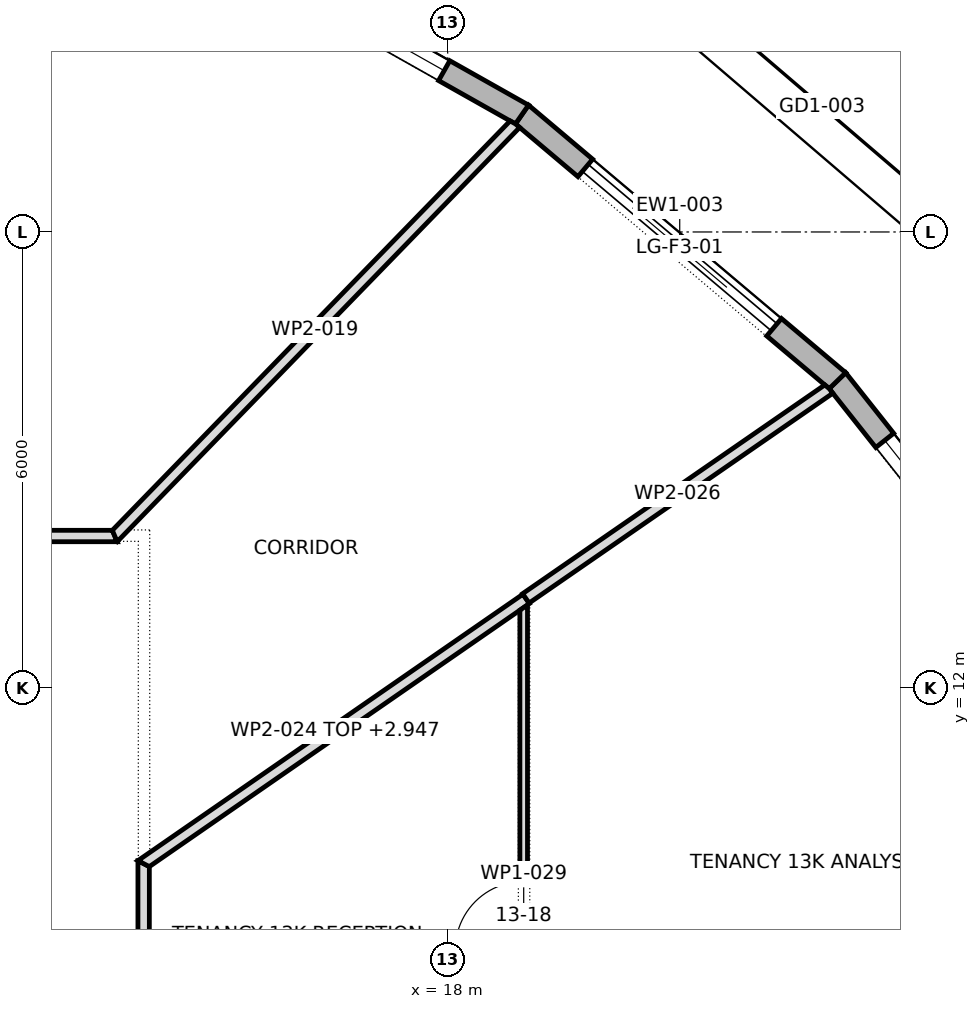
"""IFC4 building model, lengths in metres.
Left out: names, types, materials, properties, quantities, classifications, styles, units other than length and angle.
Written with IfcOpenShell. Run it as: python <this file> out.ifc"""

import sys

from ifc_helpers import new_model, si_unit, direction, frame, frame_2d, origin, place, context, subcontext, project, spatial, polyline, rectangle, outline, extrude, element, fill, save


model = new_model("IFC4")
c1 = context("Model", 3, precision=1e-05, world=origin(), true_north=direction((0.0, 1.0)))
c2 = subcontext(c1, "Body", "Model", "MODEL_VIEW")
j1 = project(units=[si_unit("LENGTHUNIT", "METRE"), si_unit("PLANEANGLEUNIT", "RADIAN")], contexts=[c1])
p1 = place(None, origin())
s1 = spatial("IfcSite", under=j1, at=p1, CompositionType="ELEMENT")
p2 = place(p1, origin())
s2 = spatial("IfcBuilding", under=s1, at=p2, CompositionType="ELEMENT")
p3 = place(p2, frame((0.0, 0.0, 190.9)))
s3 = spatial("IfcBuildingStorey", under=s2, at=p3, CompositionType="ELEMENT", Elevation=190.9)
p4 = place(p3, frame((26.39, 11.924, 0.0), z_axis=(0.0, 0.0, 1.0), x_axis=(-0.620829074232, 0.783945955145, 0.0)))
e1 = element("IfcWall", 1, at=p4, inside=s3, PredefinedType="STANDARD", context=c2, shape_type="SweptSolid", body=[
    extrude(outline(polyline([(-0.016, -0.15), (5.27, -0.15), (5.24, 0.15), (0.016, 0.15), (-0.016, -0.15)])), origin(), (0.0, 0.0, 1.0), 3.7),
])
p5 = place(p4, frame((1.003, 0.0, 0.6)))
e2 = element("IfcOpeningElement", 2, at=p5, cuts=e1, PredefinedType="OPENING", context=c2, shape_type="SweptSolid", body=[
    extrude(rectangle(XDim=3.25, YDim=2.65, at=frame_2d((1.625, 1.325))), frame((0.0, 0.162, 0.0), z_axis=(0.0, -1.0, 0.0), x_axis=(1.0, 0.0, 0.0)), (0.0, 0.0, 1.0), 0.324),
])
p6 = place(p3, frame((23.128, 16.044, 0.0), z_axis=(0.0, 0.0, 1.0), x_axis=(-0.764330261608, 0.644824977176, 0.0)))
e3 = element("IfcWall", 3, at=p6, inside=s3, PredefinedType="STANDARD", context=c2, shape_type="SweptSolid", body=[
    extrude(outline(polyline([(-0.015, -0.15), (5.444, -0.15), (5.416, 0.15), (0.015, 0.15), (-0.015, -0.15)])), origin(), (0.0, 0.0, 1.0), 3.7),
])
p7 = place(p6, frame((1.09, 0.0, 0.0)))
e4 = element("IfcOpeningElement", 4, at=p7, cuts=e3, PredefinedType="OPENING", context=c2, shape_type="SweptSolid", body=[
    extrude(rectangle(XDim=3.25, YDim=3.25, at=frame_2d((1.625, 1.625))), frame((0.0, 0.162, 0.0), z_axis=(0.0, -1.0, 0.0), x_axis=(1.0, 0.0, 0.0)), (0.0, 0.0, 1.0), 0.324),
])
p8 = place(p3, frame((18.977, 19.545, 0.0), z_axis=(0.0, 0.0, 1.0), x_axis=(-0.871083701819, 0.491134588912, 0.0)))
e5 = element("IfcWall", 5, at=p8, inside=s3, PredefinedType="STANDARD", context=c2, shape_type="SweptSolid", body=[
    extrude(outline(polyline([(-0.014, -0.15), (5.613, -0.15), (5.586, 0.15), (0.014, 0.15), (-0.014, -0.15)])), origin(), (0.0, 0.0, 1.0), 3.7),
])
p9 = place(p8, frame((1.175, 0.0, 0.6)))
e6 = element("IfcOpeningElement", 6, at=p9, cuts=e5, PredefinedType="OPENING", context=c2, shape_type="SweptSolid", body=[
    extrude(rectangle(XDim=3.25, YDim=2.65, at=frame_2d((1.625, 1.325))), frame((0.0, 0.162, 0.0), z_axis=(0.0, -1.0, 0.0), x_axis=(1.0, 0.0, 0.0)), (0.0, 0.0, 1.0), 0.324),
])
p10 = place(p3, frame((-13.652, 14.0, 0.0), z_axis=(0.0, 0.0, 1.0), x_axis=(1.0, 0.0, 0.0)))
e7 = element("IfcWall", 7, at=p10, inside=s3, PredefinedType="PARTITIONING", context=c2, shape_type="SweptSolid", body=[
    extrude(outline(polyline([(27.303, -0.075), (27.303, -0.075), (27.24, 0.075), (25.299, 0.075), (23.358, 0.075), (21.416, 0.075), (19.475, 0.075), (17.534, 0.075), (15.593, 0.075), (13.652, 0.075), (11.71, 0.075), (9.769, 0.075), (7.828, 0.075), (5.887, 0.075), (3.946, 0.075), (2.004, 0.075), (0.063, 0.075), (0.0, -0.075), (0.0, -0.075), (1.95, -0.075), (3.9, -0.075), (5.851, -0.075), (7.801, -0.075), (9.751, -0.075), (11.701, -0.075), (13.652, -0.075), (15.602, -0.075), (17.552, -0.075), (19.502, -0.075), (21.453, -0.075), (23.403, -0.075), (25.353, -0.075), (27.303, -0.075)])), origin(), (0.0, 0.0, 1.0), 3.7),
])
p11 = place(p10, frame((19.562, 0.0, 0.0)))
e8 = element("IfcOpeningElement", 8, at=p11, cuts=e7, PredefinedType="OPENING", context=c2, shape_type="SweptSolid", body=[
    extrude(rectangle(XDim=1.8, YDim=2.1, at=frame_2d((0.9, 1.05))), frame((0.0, 0.087, 0.0), z_axis=(0.0, -1.0, 0.0), x_axis=(1.0, 0.0, 0.0)), (0.0, 0.0, 1.0), 0.174),
])
p12 = place(p10, frame((5.942, 0.0, 0.0)))
e9 = element("IfcOpeningElement", 9, at=p12, cuts=e7, PredefinedType="OPENING", context=c2, shape_type="SweptSolid", body=[
    extrude(rectangle(XDim=1.8, YDim=2.1, at=frame_2d((0.9, 1.05))), frame((0.0, 0.087, 0.0), z_axis=(0.0, -1.0, 0.0), x_axis=(1.0, 0.0, 0.0)), (0.0, 0.0, 1.0), 0.174),
])
p13 = place(p3, frame((13.598, 13.977, 0.0), z_axis=(0.0, 0.0, 1.0), x_axis=(0.696864554069, 0.717202756048, 0.0)))
e10 = element("IfcWall", 10, at=p13, inside=s3, PredefinedType="PARTITIONING", context=c2, shape_type="SweptSolid", body=[
    extrude(outline(polyline([(7.599, -0.075), (7.599, -0.074), (7.594, -0.003), (7.573, 0.075), (5.696, 0.075), (3.818, 0.075), (1.941, 0.075), (0.063, 0.075), (0.032, 0.0), (0.0, -0.075), (1.9, -0.075), (3.799, -0.075), (5.699, -0.075), (7.599, -0.075)])), origin(), (0.0, 0.0, 1.0), 3.7),
])
p14 = place(p3, frame((14.0, -9.729, 0.0), z_axis=(0.0, 0.0, 1.0), x_axis=(0.0, 1.0, 0.0)))
e11 = element("IfcWall", 11, at=p14, inside=s3, PredefinedType="PARTITIONING", context=c2, shape_type="SweptSolid", body=[
    extrude(outline(polyline([(0.079, -0.075), (2.009, -0.075), (3.939, -0.075), (5.869, -0.075), (7.799, -0.075), (9.729, -0.075), (11.659, -0.075), (13.59, -0.075), (15.52, -0.075), (17.45, -0.075), (19.38, -0.075), (19.458, 0.075), (19.458, 0.075), (17.513, 0.075), (15.567, 0.075), (13.621, 0.075), (11.675, 0.075), (9.729, 0.075), (7.783, 0.075), (5.838, 0.075), (3.892, 0.075), (1.946, 0.075), (0.0, 0.075), (0.0, 0.075), (0.079, -0.075)])), origin(), (0.0, 0.0, 1.0), 3.7),
])
p15 = place(p14, frame((2.594, 0.0, 0.0)))
e12 = element("IfcOpeningElement", 12, at=p15, cuts=e11, PredefinedType="OPENING", context=c2, shape_type="SweptSolid", body=[
    extrude(rectangle(XDim=1.0, YDim=2.1, at=frame_2d((0.5, 1.05))), frame((0.0, 0.087, 0.0), z_axis=(0.0, -1.0, 0.0), x_axis=(1.0, 0.0, 0.0)), (0.0, 0.0, 1.0), 0.174),
])
p16 = place(p14, frame((9.229, 0.0, 0.0)))
e13 = element("IfcOpeningElement", 13, at=p16, cuts=e11, PredefinedType="OPENING", context=c2, shape_type="SweptSolid", body=[
    extrude(rectangle(XDim=1.0, YDim=2.1, at=frame_2d((0.5, 1.05))), frame((0.0, 0.087, 0.0), z_axis=(0.0, -1.0, 0.0), x_axis=(1.0, 0.0, 0.0)), (0.0, 0.0, 1.0), 0.174),
])
p17 = place(p14, frame((15.864, 0.0, 0.0)))
e14 = element("IfcOpeningElement", 14, at=p17, cuts=e11, PredefinedType="OPENING", context=c2, shape_type="SweptSolid", body=[
    extrude(rectangle(XDim=1.0, YDim=2.1, at=frame_2d((0.5, 1.05))), frame((0.0, 0.087, 0.0), z_axis=(0.0, -1.0, 0.0), x_axis=(1.0, 0.0, 0.0)), (0.0, 0.0, 1.0), 0.174),
])
p18 = place(p3, frame((13.968, 9.667, 0.0), z_axis=(0.0, 0.0, 1.0), x_axis=(0.822290630684, 0.569067762827, 0.0)))
e15 = element("IfcWall", 15, at=p18, inside=s3, PredefinedType="PARTITIONING", context=c2, shape_type="SweptSolid", body=[
    extrude(outline(polyline([(6.16, 0.075), (4.62, 0.075), (3.08, 0.075), (1.54, 0.075), (0.0, 0.075), (0.079, -0.075), (1.599, -0.075), (3.119, -0.075), (4.64, -0.075), (6.16, -0.075), (6.16, 0.075)])), origin(), (0.0, 0.0, 1.0), 2.947),
])
p19 = place(p3, frame((19.028, 13.179, 0.0), z_axis=(0.0, 0.0, 1.0), x_axis=(0.822732902653, 0.568428158074, 0.0)))
e16 = element("IfcWall", 16, at=p19, inside=s3, PredefinedType="PARTITIONING", context=c2, shape_type="SweptSolid", body=[
    extrude(outline(polyline([(4.857, -0.075), (4.857, -0.068), (4.852, 0.002), (4.832, 0.075), (3.221, 0.075), (1.611, 0.075), (0.0, 0.075), (0.0, -0.04), (0.0, -0.075), (1.619, -0.075), (3.238, -0.075), (4.857, -0.075)])), origin(), (0.0, 0.0, 1.0), 3.7),
])
p20 = place(p3, frame((19.0, 13.093, 0.0), z_axis=(0.0, 0.0, 1.0), x_axis=(0.0, -1.0, 0.0)))
e17 = element("IfcWall", 17, at=p20, inside=s3, PredefinedType="PARTITIONING", context=c2, shape_type="SweptSolid", body=[
    extrude(outline(polyline([(8.167, -0.05), (8.167, -0.049), (8.142, 0.05), (6.513, 0.05), (4.885, 0.05), (3.257, 0.05), (1.628, 0.05), (0.0, 0.05), (0.0, 0.05), (0.069, -0.05), (1.688, -0.05), (3.308, -0.05), (4.928, -0.05), (6.547, -0.05), (8.167, -0.05)])), origin(), (0.0, 0.0, 1.0), 3.7),
])
p21 = place(p20, frame((3.638, 0.0, 0.0)))
e18 = element("IfcOpeningElement", 18, at=p21, cuts=e17, PredefinedType="OPENING", context=c2, shape_type="SweptSolid", body=[
    extrude(rectangle(XDim=0.9, YDim=2.1, at=frame_2d((0.45, 1.05))), frame((0.0, 0.062, 0.0), z_axis=(0.0, -1.0, 0.0), x_axis=(1.0, 0.0, 0.0)), (0.0, 0.0, 1.0), 0.124),
])
p22 = place(p5, origin())
e19 = element("IfcWindow", 19, at=p22, inside=s3, PartitioningType="TRIPLE_PANEL_VERTICAL", PredefinedType="WINDOW", context=c2, shape_type="SweptSolid", body=[
    extrude(rectangle(XDim=3.25, YDim=2.65, at=frame_2d((1.625, 1.325))), frame((0.0, 0.03, 0.0), z_axis=(0.0, -1.0, 0.0), x_axis=(1.0, 0.0, 0.0)), (0.0, 0.0, 1.0), 0.06),
])
fill(e2, e19)
p23 = place(p7, origin())
e20 = element("IfcDoor", 20, at=p23, inside=s3, OperationType="DOUBLE_DOOR_SLIDING", PredefinedType="DOOR", context=c2, shape_type="SweptSolid", body=[
    extrude(rectangle(XDim=3.25, YDim=3.25, at=frame_2d((1.625, 1.625))), frame((0.0, 0.025, 0.0), z_axis=(0.0, -1.0, 0.0), x_axis=(1.0, 0.0, 0.0)), (0.0, 0.0, 1.0), 0.05),
])
fill(e4, e20)
p24 = place(p9, origin())
e21 = element("IfcWindow", 21, at=p24, inside=s3, PartitioningType="TRIPLE_PANEL_VERTICAL", PredefinedType="WINDOW", context=c2, shape_type="SweptSolid", body=[
    extrude(rectangle(XDim=3.25, YDim=2.65, at=frame_2d((1.625, 1.325))), frame((0.0, 0.03, 0.0), z_axis=(0.0, -1.0, 0.0), x_axis=(1.0, 0.0, 0.0)), (0.0, 0.0, 1.0), 0.06),
])
fill(e6, e21)
p25 = place(p21, frame((0.9, 0.0, 0.0), z_axis=(0.0, 0.0, 1.0), x_axis=(-1.0, 0.0, 0.0)))
e22 = element("IfcDoor", 22, at=p25, inside=s3, OperationType="SINGLE_SWING_RIGHT", PredefinedType="DOOR", context=c2, shape_type="SweptSolid", body=[
    extrude(rectangle(XDim=0.9, YDim=2.1, at=frame_2d((0.45, 1.05))), frame((0.0, 0.025, 0.0), z_axis=(0.0, -1.0, 0.0), x_axis=(1.0, 0.0, 0.0)), (0.0, 0.0, 1.0), 0.05),
])
fill(e18, e22)
save(model, sys.argv[1])
